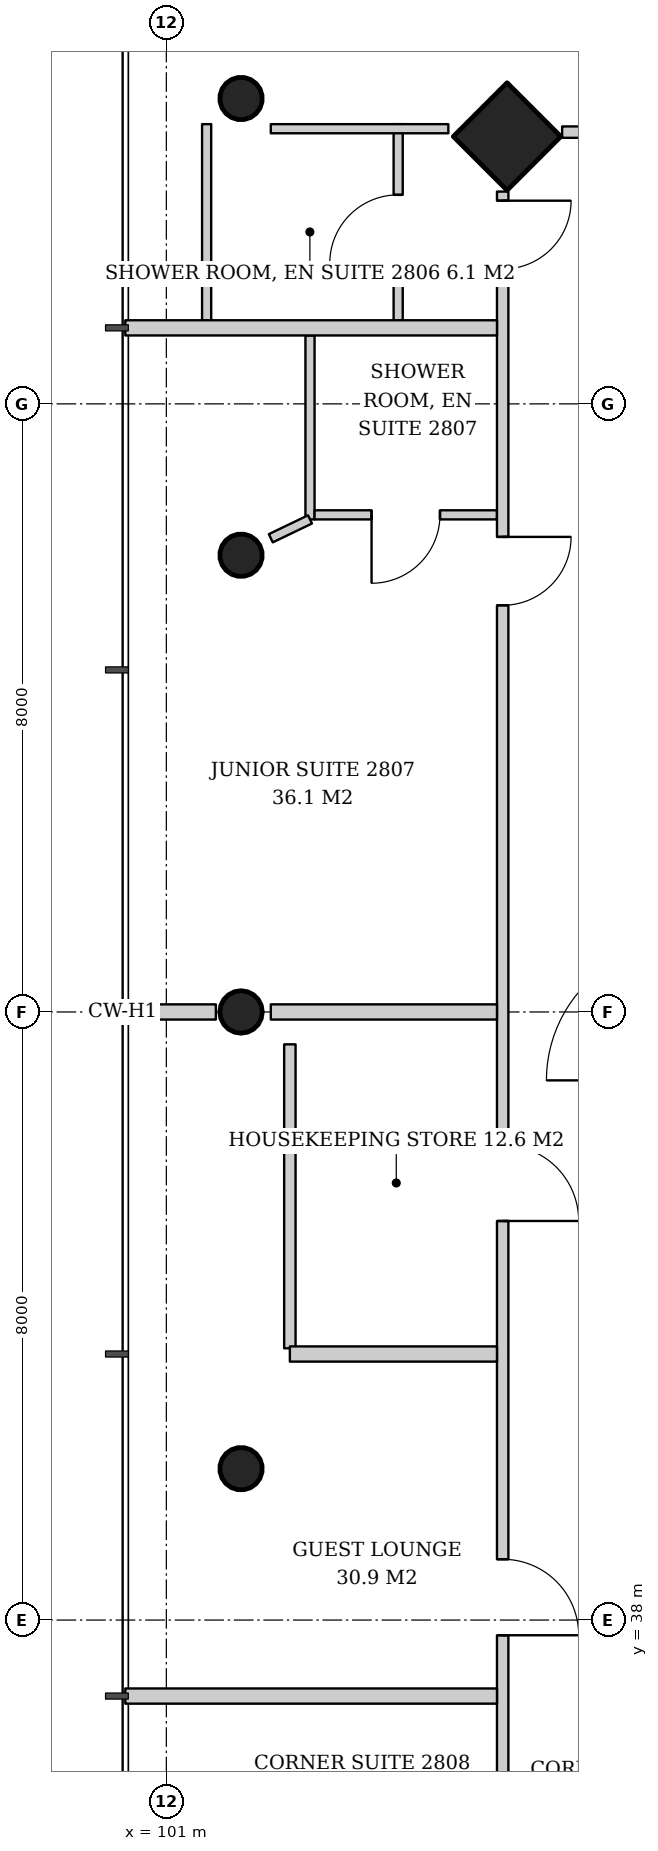
"""IFC4 building model, lengths in metres.
Left out: names, types, materials, properties, quantities, classifications, styles, units other than length and angle.
Written with IfcOpenShell. Run it as: python <this file> out.ifc"""

import sys

from ifc_helpers import new_model, si_unit, direction, frame, frame_2d, origin, origin_2d, place, context, subcontext, project, spatial, rectangle, hollow_circle, extrude, element, fill, save


model = new_model("IFC4")
c1 = context("Model", 3, precision=1e-05, world=origin(), true_north=direction((0.0, 1.0)))
c2 = subcontext(c1, "Body", "Model", "MODEL_VIEW")
j1 = project(units=[si_unit("LENGTHUNIT", "METRE"), si_unit("PLANEANGLEUNIT", "RADIAN")], contexts=[c1])
p1 = place(None, origin())
s1 = spatial("IfcSite", under=j1, at=p1, CompositionType="ELEMENT")
p2 = place(p1, origin())
s2 = spatial("IfcBuilding", under=s1, at=p2, CompositionType="ELEMENT")
p3 = place(p2, frame((0.0, 0.0, 112.2)))
s3 = spatial("IfcBuildingStorey", under=s2, at=p3, CompositionType="ELEMENT", Elevation=112.2)
p4 = place(p3, frame((105.431, 57.569, 0.0), z_axis=(0.042965756413, -0.042965756413, 0.998152236661), x_axis=(0.707106781187, 0.707106781187, 0.0)))
e1 = element("IfcColumn", 1, at=p4, inside=s3, PredefinedType="COLUMN", context=c2, shape_type="SweptSolid", body=[
    extrude(rectangle(XDim=1.0, YDim=1.0, at=origin_2d()), origin(), (0.0, 0.0, 1.0), 3.807),
])
p5 = place(p3, frame((101.931, 58.069, 0.0), z_axis=(0.042965756413, -0.042965756413, 0.998152236661), x_axis=(0.707106781187, 0.707106781187, 0.0)))
e2 = element("IfcColumn", 2, at=p5, inside=s3, PredefinedType="COLUMN", context=c2, shape_type="SweptSolid", body=[
    extrude(hollow_circle(Radius=0.28, WallThickness=0.02, at=origin_2d()), origin(), (0.0, 0.0, 1.0), 3.807),
])
p6 = place(p3, frame((101.931, 52.034, 0.0), z_axis=(0.042995531285, -0.021497765643, 0.998843946952), x_axis=(0.4472135955, 0.894427191, 0.0)))
e3 = element("IfcColumn", 3, at=p6, inside=s3, PredefinedType="COLUMN", context=c2, shape_type="SweptSolid", body=[
    extrude(hollow_circle(Radius=0.28, WallThickness=0.02, at=origin_2d()), origin(), (0.0, 0.0, 1.0), 3.804),
])
p7 = place(p3, frame((101.931, 46.0, 0.0), z_axis=(0.043005470007, 0.0, 0.999074836811), x_axis=(0.0, 1.0, 0.0)))
e4 = element("IfcColumn", 4, at=p7, inside=s3, PredefinedType="COLUMN", context=c2, shape_type="SweptSolid", body=[
    extrude(hollow_circle(Radius=0.28, WallThickness=0.02, at=origin_2d()), origin(), (0.0, 0.0, 1.0), 3.803),
])
p8 = place(p3, frame((101.931, 39.966, 0.0), z_axis=(0.042995531285, 0.021497765643, 0.998843946952), x_axis=(-0.4472135955, 0.894427191, 0.0)))
e5 = element("IfcColumn", 5, at=p8, inside=s3, PredefinedType="COLUMN", context=c2, shape_type="SweptSolid", body=[
    extrude(hollow_circle(Radius=0.28, WallThickness=0.02, at=origin_2d()), origin(), (0.0, 0.0, 1.0), 3.804),
])
p9 = place(p3, frame((127.793, 57.575, 0.0), z_axis=(0.0, 0.0, 1.0), x_axis=(-1.0, 0.0, 0.0)))
e6 = element("IfcWall", 6, at=p9, inside=s3, PredefinedType="PARTITIONING", context=c2, shape_type="SweptSolid", body=[
    extrude(rectangle(XDim=21.586, YDim=0.15, at=frame_2d((10.793, 0.0))), origin(), (0.0, 0.0, 1.0), 2.9),
])
p10 = place(p9, frame((0.12, 0.0, 0.0)))
e7 = element("IfcOpeningElement", 7, at=p10, cuts=e6, PredefinedType="OPENING", context=c2, shape_type="SweptSolid", body=[
    extrude(rectangle(XDim=0.9, YDim=2.1, at=frame_2d((0.45, 1.05))), frame((0.0, 0.085, 0.0), z_axis=(0.0, -1.0, 0.0), x_axis=(1.0, 0.0, 0.0)), (0.0, 0.0, 1.0), 0.17),
])
p11 = place(p9, frame((4.543, 0.0, 0.0)))
e8 = element("IfcOpeningElement", 8, at=p11, cuts=e6, PredefinedType="OPENING", context=c2, shape_type="SweptSolid", body=[
    extrude(rectangle(XDim=0.9, YDim=2.1, at=frame_2d((0.45, 1.05))), frame((0.0, 0.085, 0.0), z_axis=(0.0, -1.0, 0.0), x_axis=(1.0, 0.0, 0.0)), (0.0, 0.0, 1.0), 0.17),
])
p12 = place(p9, frame((13.493, 0.0, 0.0)))
e9 = element("IfcOpeningElement", 9, at=p12, cuts=e6, PredefinedType="OPENING", context=c2, shape_type="SweptSolid", body=[
    extrude(rectangle(XDim=1.0, YDim=2.1, at=frame_2d((0.5, 1.05))), frame((0.0, 0.085, 0.0), z_axis=(0.0, -1.0, 0.0), x_axis=(1.0, 0.0, 0.0)), (0.0, 0.0, 1.0), 0.17),
])
p13 = place(p3, frame((104.05, 55.1, 0.0), z_axis=(0.0, 0.0, 1.0), x_axis=(0.0, 1.0, 0.0)))
e10 = element("IfcWall", 10, at=p13, inside=s3, PredefinedType="PARTITIONING", context=c2, shape_type="SweptSolid", body=[
    extrude(rectangle(XDim=2.58, YDim=0.12, at=frame_2d((1.29, 0.0))), origin(), (0.0, 0.0, 1.0), 2.9),
])
p14 = place(p13, frame((0.75, 0.0, 0.0)))
e11 = element("IfcOpeningElement", 11, at=p14, cuts=e10, PredefinedType="OPENING", context=c2, shape_type="SweptSolid", body=[
    extrude(rectangle(XDim=0.9, YDim=2.1, at=frame_2d((0.45, 1.05))), frame((0.0, 0.07, 0.0), z_axis=(0.0, -1.0, 0.0), x_axis=(1.0, 0.0, 0.0)), (0.0, 0.0, 1.0), 0.14),
])
p15 = place(p3, frame((101.53, 55.1, 0.0), z_axis=(0.0, 0.0, 1.0), x_axis=(0.0, 1.0, 0.0)))
e12 = element("IfcWall", 12, at=p15, inside=s3, PredefinedType="PARTITIONING", context=c2, shape_type="SweptSolid", body=[
    extrude(rectangle(XDim=2.58, YDim=0.12, at=frame_2d((1.29, 0.0))), origin(), (0.0, 0.0, 1.0), 3.6),
])
p16 = place(p3, frame((104.71, 57.62, 0.0), z_axis=(0.0, 0.0, 1.0), x_axis=(-1.0, 0.0, 0.0)))
e13 = element("IfcWall", 13, at=p16, inside=s3, PredefinedType="PARTITIONING", context=c2, shape_type="SweptSolid", body=[
    extrude(rectangle(XDim=2.336, YDim=0.12, at=frame_2d((1.168, 0.0))), origin(), (0.0, 0.0, 1.0), 3.2),
])
p17 = place(p3, frame((102.89, 54.9, 0.0), z_axis=(0.0, 0.0, 1.0), x_axis=(0.0, -1.0, 0.0)))
e14 = element("IfcWall", 14, at=p17, inside=s3, PredefinedType="PARTITIONING", context=c2, shape_type="SweptSolid", body=[
    extrude(rectangle(XDim=2.42, YDim=0.12, at=frame_2d((1.21, 0.0))), origin(), (0.0, 0.0, 1.0), 3.6),
])
p18 = place(p3, frame((105.35, 52.54, 0.0), z_axis=(0.0, 0.0, 1.0), x_axis=(-1.0, 0.0, 0.0)))
e15 = element("IfcWall", 15, at=p18, inside=s3, PredefinedType="PARTITIONING", context=c2, shape_type="SweptSolid", body=[
    extrude(rectangle(XDim=2.4, YDim=0.12, at=frame_2d((1.2, 0.0))), origin(), (0.0, 0.0, 1.0), 3.6),
])
p19 = place(p18, frame((0.75, 0.0, 0.0)))
e16 = element("IfcOpeningElement", 16, at=p19, cuts=e15, PredefinedType="OPENING", context=c2, shape_type="SweptSolid", body=[
    extrude(rectangle(XDim=0.9, YDim=2.1, at=frame_2d((0.45, 1.05))), frame((0.0, 0.07, 0.0), z_axis=(0.0, -1.0, 0.0), x_axis=(1.0, 0.0, 0.0)), (0.0, 0.0, 1.0), 0.14),
])
p20 = place(p3, frame((102.625, 45.574, 0.0), z_axis=(0.0, 0.0, 1.0), x_axis=(0.0, -1.0, 0.0)))
e17 = element("IfcWall", 17, at=p20, inside=s3, PredefinedType="PARTITIONING", context=c2, shape_type="SweptSolid", body=[
    extrude(rectangle(XDim=3.999, YDim=0.15, at=frame_2d((2.0, 0.0))), origin(), (0.0, 0.0, 1.0), 3.0),
])
p21 = place(p3, frame((105.425, 56.793, 0.0), z_axis=(0.0, 0.0, 1.0), x_axis=(0.0, -1.0, 0.0)))
e18 = element("IfcWall", 18, at=p21, inside=s3, PredefinedType="PARTITIONING", context=c2, shape_type="SweptSolid", body=[
    extrude(rectangle(XDim=21.586, YDim=0.15, at=frame_2d((10.793, 0.0))), origin(), (0.0, 0.0, 1.0), 2.9),
])
p22 = place(p21, frame((0.12, 0.0, 0.0)))
e19 = element("IfcOpeningElement", 19, at=p22, cuts=e18, PredefinedType="OPENING", context=c2, shape_type="SweptSolid", body=[
    extrude(rectangle(XDim=0.9, YDim=2.1, at=frame_2d((0.45, 1.05))), frame((0.0, 0.085, 0.0), z_axis=(0.0, -1.0, 0.0), x_axis=(1.0, 0.0, 0.0)), (0.0, 0.0, 1.0), 0.17),
])
p23 = place(p21, frame((4.543, 0.0, 0.0)))
e20 = element("IfcOpeningElement", 20, at=p23, cuts=e18, PredefinedType="OPENING", context=c2, shape_type="SweptSolid", body=[
    extrude(rectangle(XDim=0.9, YDim=2.1, at=frame_2d((0.45, 1.05))), frame((0.0, 0.085, 0.0), z_axis=(0.0, -1.0, 0.0), x_axis=(1.0, 0.0, 0.0)), (0.0, 0.0, 1.0), 0.17),
])
p24 = place(p21, frame((12.543, 0.0, 0.0)))
e21 = element("IfcOpeningElement", 21, at=p24, cuts=e18, PredefinedType="OPENING", context=c2, shape_type="SweptSolid", body=[
    extrude(rectangle(XDim=1.0, YDim=2.1, at=frame_2d((0.5, 1.05))), frame((0.0, 0.085, 0.0), z_axis=(0.0, -1.0, 0.0), x_axis=(1.0, 0.0, 0.0)), (0.0, 0.0, 1.0), 0.17),
])
p25 = place(p21, frame((17.993, 0.0, 0.0)))
e22 = element("IfcOpeningElement", 22, at=p25, cuts=e18, PredefinedType="OPENING", context=c2, shape_type="SweptSolid", body=[
    extrude(rectangle(XDim=1.0, YDim=2.1, at=frame_2d((0.5, 1.05))), frame((0.0, 0.085, 0.0), z_axis=(0.0, -1.0, 0.0), x_axis=(1.0, 0.0, 0.0)), (0.0, 0.0, 1.0), 0.17),
])
p26 = place(p3, frame((105.35, 55.0, 0.0), z_axis=(0.0, 0.0, 1.0), x_axis=(-1.0, 0.0, 0.0)))
e23 = element("IfcWall", 23, at=p26, inside=s3, PredefinedType="PARTITIONING", context=c2, shape_type="SweptSolid", body=[
    extrude(rectangle(XDim=4.89, YDim=0.2, at=frame_2d((2.445, 0.0))), origin(), (0.0, 0.0, 1.0), 2.9),
])
p27 = place(p3, frame((105.35, 46.0, 0.0), z_axis=(0.0, 0.0, 1.0), x_axis=(-1.0, 0.0, 0.0)))
e24 = element("IfcWall", 24, at=p27, inside=s3, PredefinedType="PARTITIONING", context=c2, shape_type="SweptSolid", body=[
    extrude(rectangle(XDim=2.976, YDim=0.2, at=frame_2d((1.488, 0.0))), origin(), (0.0, 0.0, 1.0), 3.6),
])
p28 = place(p3, frame((101.652, 46.0, 0.0), z_axis=(0.0, 0.0, 1.0), x_axis=(-1.0, 0.0, 0.0)))
e25 = element("IfcWall", 25, at=p28, inside=s3, PredefinedType="PARTITIONING", context=c2, shape_type="SweptSolid", body=[
    extrude(rectangle(XDim=1.192, YDim=0.2, at=frame_2d((0.596, 0.0))), origin(), (0.0, 0.0, 1.0), 3.6),
])
p29 = place(p3, frame((105.35, 41.5, 0.0), z_axis=(0.0, 0.0, 1.0), x_axis=(-1.0, 0.0, 0.0)))
e26 = element("IfcWall", 26, at=p29, inside=s3, PredefinedType="PARTITIONING", context=c2, shape_type="SweptSolid", body=[
    extrude(rectangle(XDim=2.725, YDim=0.2, at=frame_2d((1.363, 0.0))), origin(), (0.0, 0.0, 1.0), 3.6),
])
p30 = place(p3, frame((105.35, 37.0, 0.0), z_axis=(0.0, 0.0, 1.0), x_axis=(-1.0, 0.0, 0.0)))
e27 = element("IfcWall", 27, at=p30, inside=s3, PredefinedType="PARTITIONING", context=c2, shape_type="SweptSolid", body=[
    extrude(rectangle(XDim=4.89, YDim=0.2, at=frame_2d((2.445, 0.0))), origin(), (0.0, 0.0, 1.0), 3.2),
])
p31 = place(p3, frame((102.89, 52.48, 0.0), z_axis=(0.0, 0.0, 1.0), x_axis=(-0.901316511947, -0.433161107778, 0.0)))
e28 = element("IfcWall", 28, at=p31, inside=s3, PredefinedType="PARTITIONING", context=c2, shape_type="SweptSolid", body=[
    extrude(rectangle(XDim=0.572, YDim=0.12, at=frame_2d((0.286, 0.0))), origin(), (0.0, 0.0, 1.0), 3.6),
])
p32 = place(p14, origin())
e29 = element("IfcDoor", 29, at=p32, inside=s3, OperationType="SINGLE_SWING_LEFT", PredefinedType="DOOR", context=c2, shape_type="SweptSolid", body=[
    extrude(rectangle(XDim=0.9, YDim=2.1, at=frame_2d((0.45, 1.05))), frame((0.0, 0.025, 0.0), z_axis=(0.0, -1.0, 0.0), x_axis=(1.0, 0.0, 0.0)), (0.0, 0.0, 1.0), 0.05),
])
fill(e11, e29)
p33 = place(p19, origin())
e30 = element("IfcDoor", 30, at=p33, inside=s3, OperationType="SINGLE_SWING_RIGHT", PredefinedType="DOOR", context=c2, shape_type="SweptSolid", body=[
    extrude(rectangle(XDim=0.9, YDim=2.1, at=frame_2d((0.45, 1.05))), frame((0.0, 0.025, 0.0), z_axis=(0.0, -1.0, 0.0), x_axis=(1.0, 0.0, 0.0)), (0.0, 0.0, 1.0), 0.05),
])
fill(e16, e30)
p34 = place(p22, origin())
e31 = element("IfcDoor", 31, at=p34, inside=s3, OperationType="SINGLE_SWING_LEFT", PredefinedType="DOOR", context=c2, shape_type="SweptSolid", body=[
    extrude(rectangle(XDim=0.9, YDim=2.1, at=frame_2d((0.45, 1.05))), frame((0.0, 0.025, 0.0), z_axis=(0.0, -1.0, 0.0), x_axis=(1.0, 0.0, 0.0)), (0.0, 0.0, 1.0), 0.05),
])
fill(e19, e31)
p35 = place(p23, origin())
e32 = element("IfcDoor", 32, at=p35, inside=s3, OperationType="SINGLE_SWING_LEFT", PredefinedType="DOOR", context=c2, shape_type="SweptSolid", body=[
    extrude(rectangle(XDim=0.9, YDim=2.1, at=frame_2d((0.45, 1.05))), frame((0.0, 0.025, 0.0), z_axis=(0.0, -1.0, 0.0), x_axis=(1.0, 0.0, 0.0)), (0.0, 0.0, 1.0), 0.05),
])
fill(e20, e32)
p36 = place(p24, origin())
e33 = element("IfcDoor", 33, at=p36, inside=s3, OperationType="SINGLE_SWING_RIGHT", PredefinedType="DOOR", context=c2, shape_type="SweptSolid", body=[
    extrude(rectangle(XDim=1.0, YDim=2.1, at=frame_2d((0.5, 1.05))), frame((0.0, 0.025, 0.0), z_axis=(0.0, -1.0, 0.0), x_axis=(1.0, 0.0, 0.0)), (0.0, 0.0, 1.0), 0.05),
])
fill(e21, e33)
p37 = place(p25, origin())
e34 = element("IfcDoor", 34, at=p37, inside=s3, OperationType="SINGLE_SWING_RIGHT", PredefinedType="DOOR", context=c2, shape_type="SweptSolid", body=[
    extrude(rectangle(XDim=1.0, YDim=2.1, at=frame_2d((0.5, 1.05))), frame((0.0, 0.025, 0.0), z_axis=(0.0, -1.0, 0.0), x_axis=(1.0, 0.0, 0.0)), (0.0, 0.0, 1.0), 0.05),
])
fill(e22, e34)
save(model, sys.argv[1])
